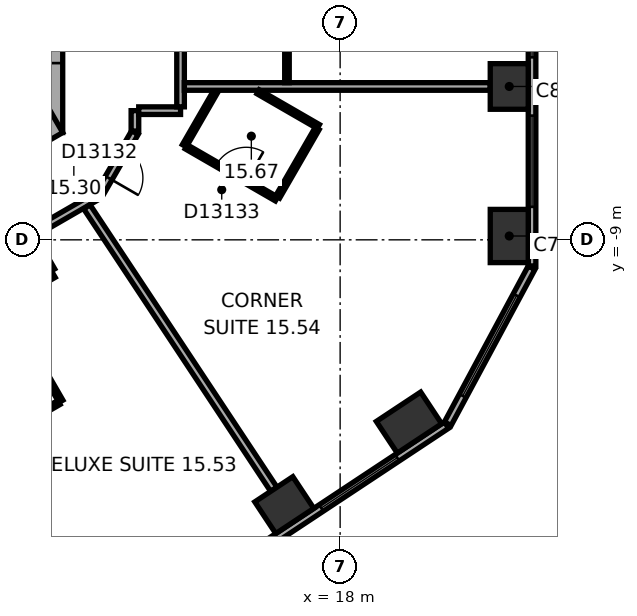
"""IFC4 building model, lengths in metres.
Left out: names, types, materials, properties, quantities, classifications, styles, units other than length and angle.
Written with IfcOpenShell. Run it as: python <this file> out.ifc"""

import sys

from ifc_helpers import new_model, si_unit, direction, frame, frame_2d, origin, origin_2d, place, context, subcontext, project, spatial, rectangle, extrude, element, fill, save


model = new_model("IFC4")
c1 = context("Model", 3, precision=1e-05, world=origin(), true_north=direction((0.0, 1.0)))
c2 = subcontext(c1, "Body", "Model", "MODEL_VIEW")
j1 = project(units=[si_unit("LENGTHUNIT", "METRE"), si_unit("PLANEANGLEUNIT", "RADIAN")], contexts=[c1])
p1 = place(None, origin())
s1 = spatial("IfcSite", under=j1, at=p1, CompositionType="ELEMENT")
p2 = place(p1, origin())
s2 = spatial("IfcBuilding", under=s1, at=p2, CompositionType="ELEMENT")
p3 = place(p2, frame((0.0, 0.0, 70.4)))
s3 = spatial("IfcBuildingStorey", under=s2, at=p3, CompositionType="ELEMENT", Elevation=70.4)
p4 = place(p3, frame((22.45, -8.899, 0.0), z_axis=(0.0, 0.0, 1.0), x_axis=(0.0, 1.0, 0.0)))
e1 = element("IfcColumn", 1, at=p4, inside=s3, PredefinedType="COLUMN", context=c2, shape_type="SweptSolid", body=[
    extrude(rectangle(XDim=1.4, YDim=1.0, at=origin_2d()), origin(), (0.0, 0.0, 1.0), 3.3),
])
for number, where, z_axis, x_axis in (
    (2, (22.45, -4.965, 0.0), (0.0, 0.0, 1.0), (0.0, 1.0, 0.0)),
    (3, (16.531, -15.981, 0.0), (0.0, 0.0, 1.0), (0.834, 0.552, 0.0)),
):
    element("IfcColumn", number, at=place(p3, frame(where, z_axis=z_axis, x_axis=x_axis)), inside=s3, PredefinedType="COLUMN", context=c2, shape_type="SweptSolid", body=[
        extrude(rectangle(XDim=1.2, YDim=1.0, at=origin_2d()), origin(), (0.0, 0.0, 1.0), 3.3),
    ])
p5 = place(p3, frame((19.812, -13.809, 0.0), z_axis=(0.0, 0.0, 1.0), x_axis=(0.833885822067, 0.551936985312, 0.0)))
e4 = element("IfcColumn", 4, at=p5, inside=s3, PredefinedType="COLUMN", context=c2, shape_type="SweptSolid", body=[
    extrude(rectangle(XDim=1.4, YDim=1.0, at=origin_2d()), origin(), (0.0, 0.0, 1.0), 3.3),
])
p6 = place(p3, frame((10.1, -6.177, 0.0), z_axis=(0.0, 0.0, 1.0), x_axis=(0.0, 1.0, 0.0)))
e5 = element("IfcWall", 5, at=p6, inside=s3, PredefinedType="SHEAR", context=c2, shape_type="SweptSolid", body=[
    extrude(rectangle(XDim=12.355, YDim=1.2, at=frame_2d((6.177, 0.0))), origin(), (0.0, 0.0, 1.0), 3.3),
])
p7 = place(p6, frame((6.378, 0.0, 0.0)))
e6 = element("IfcOpeningElement", 6, at=p7, cuts=e5, PredefinedType="OPENING", context=c2, shape_type="SweptSolid", body=[
    extrude(rectangle(XDim=1.5, YDim=2.1, at=frame_2d((0.75, 1.05))), frame((0.0, 0.61, 0.0), z_axis=(0.0, -1.0, 0.0), x_axis=(1.0, 0.0, 0.0)), (0.0, 0.0, 1.0), 1.22),
])
p8 = place(p6, frame((1.828, 0.0, 0.0)))
e7 = element("IfcOpeningElement", 7, at=p8, cuts=e5, PredefinedType="OPENING", context=c2, shape_type="SweptSolid", body=[
    extrude(rectangle(XDim=1.1, YDim=2.1, at=frame_2d((0.55, 1.05))), frame((0.0, 0.61, 0.0), z_axis=(0.0, -1.0, 0.0), x_axis=(1.0, 0.0, 0.0)), (0.0, 0.0, 1.0), 1.22),
])
p9 = place(p6, frame((4.427, 0.0, 0.0)))
e8 = element("IfcOpeningElement", 8, at=p9, cuts=e5, PredefinedType="OPENING", context=c2, shape_type="SweptSolid", body=[
    extrude(rectangle(XDim=1.1, YDim=2.1, at=frame_2d((0.55, 1.05))), frame((0.0, 0.61, 0.0), z_axis=(0.0, -1.0, 0.0), x_axis=(1.0, 0.0, 0.0)), (0.0, 0.0, 1.0), 1.22),
])
p10 = place(p3, frame((-0.3, -11.836, 0.0), z_axis=(0.0, 0.0, 1.0), x_axis=(0.866021384402, 0.500006961711, 0.0)))
e9 = element("IfcWall", 9, at=p10, inside=s3, PredefinedType="SHEAR", context=c2, shape_type="SweptSolid", body=[
    extrude(rectangle(XDim=12.355, YDim=1.2, at=frame_2d((6.178, 0.0))), origin(), (0.0, 0.0, 1.0), 3.3),
])
p11 = place(p10, frame((4.128, 0.0, 0.0)))
e10 = element("IfcOpeningElement", 10, at=p11, cuts=e9, PredefinedType="OPENING", context=c2, shape_type="SweptSolid", body=[
    extrude(rectangle(XDim=0.9, YDim=2.1, at=frame_2d((0.45, 1.05))), frame((0.0, 0.61, 0.0), z_axis=(0.0, -1.0, 0.0), x_axis=(1.0, 0.0, 0.0)), (0.0, 0.0, 1.0), 1.22),
])
p12 = place(p10, frame((7.928, 0.0, 0.0)))
e11 = element("IfcOpeningElement", 11, at=p12, cuts=e9, PredefinedType="OPENING", context=c2, shape_type="SweptSolid", body=[
    extrude(rectangle(XDim=1.1, YDim=2.1, at=frame_2d((0.55, 1.05))), frame((0.0, 0.61, 0.0), z_axis=(0.0, -1.0, 0.0), x_axis=(1.0, 0.0, 0.0)), (0.0, 0.0, 1.0), 1.22),
])
p13 = place(p3, frame((23.05, -9.687, 0.0), z_axis=(0.0, 0.0, 1.0), x_axis=(0.0, 1.0, 0.0)))
e12 = element("IfcWall", 12, at=p13, inside=s3, PredefinedType="STANDARD", context=c2, shape_type="SweptSolid", body=[
    extrude(rectangle(XDim=21.246, YDim=0.2, at=frame_2d((10.623, 0.0))), origin(), (0.0, 0.0, 1.0), 3.3),
])
p14 = place(p13, frame((1.555, 0.0, 0.8)))
e13 = element("IfcOpeningElement", 13, at=p14, cuts=e12, PredefinedType="OPENING", context=c2, shape_type="SweptSolid", body=[
    extrude(rectangle(XDim=2.4, YDim=1.7, at=frame_2d((1.2, 0.85))), frame((0.0, 0.11, 0.0), z_axis=(0.0, -1.0, 0.0), x_axis=(1.0, 0.0, 0.0)), (0.0, 0.0, 1.0), 0.22),
])
p15 = place(p13, frame((5.489, 0.0, 0.8)))
e14 = element("IfcOpeningElement", 14, at=p15, cuts=e12, PredefinedType="OPENING", context=c2, shape_type="SweptSolid", body=[
    extrude(rectangle(XDim=2.4, YDim=1.7, at=frame_2d((1.2, 0.85))), frame((0.0, 0.11, 0.0), z_axis=(0.0, -1.0, 0.0), x_axis=(1.0, 0.0, 0.0)), (0.0, 0.0, 1.0), 0.22),
])
p16 = place(p13, frame((9.424, 0.0, 0.8)))
e15 = element("IfcOpeningElement", 15, at=p16, cuts=e12, PredefinedType="OPENING", context=c2, shape_type="SweptSolid", body=[
    extrude(rectangle(XDim=2.4, YDim=1.7, at=frame_2d((1.2, 0.85))), frame((0.0, 0.11, 0.0), z_axis=(0.0, -1.0, 0.0), x_axis=(1.0, 0.0, 0.0)), (0.0, 0.0, 1.0), 0.22),
])
p17 = place(p13, frame((13.358, 0.0, 0.8)))
e16 = element("IfcOpeningElement", 16, at=p17, cuts=e12, PredefinedType="OPENING", context=c2, shape_type="SweptSolid", body=[
    extrude(rectangle(XDim=2.4, YDim=1.7, at=frame_2d((1.2, 0.85))), frame((0.0, 0.11, 0.0), z_axis=(0.0, -1.0, 0.0), x_axis=(1.0, 0.0, 0.0)), (0.0, 0.0, 1.0), 0.22),
])
p18 = place(p13, frame((17.293, 0.0, 0.8)))
e17 = element("IfcOpeningElement", 17, at=p18, cuts=e12, PredefinedType="OPENING", context=c2, shape_type="SweptSolid", body=[
    extrude(rectangle(XDim=2.4, YDim=1.7, at=frame_2d((1.2, 0.85))), frame((0.0, 0.11, 0.0), z_axis=(0.0, -1.0, 0.0), x_axis=(1.0, 0.0, 0.0)), (0.0, 0.0, 1.0), 0.22),
])
p19 = place(p3, frame((3.083, -25.601, 0.0), z_axis=(0.0, 0.0, 1.0), x_axis=(0.833884295743, 0.551939291329, 0.0)))
e18 = element("IfcWall", 18, at=p19, inside=s3, PredefinedType="STANDARD", context=c2, shape_type="SweptSolid", body=[
    extrude(rectangle(XDim=21.246, YDim=0.2, at=frame_2d((10.623, 0.0))), origin(), (0.0, 0.0, 1.0), 3.3),
])
p20 = place(p19, frame((1.553, 0.0, 0.8)))
e19 = element("IfcOpeningElement", 19, at=p20, cuts=e18, PredefinedType="OPENING", context=c2, shape_type="SweptSolid", body=[
    extrude(rectangle(XDim=2.4, YDim=1.7, at=frame_2d((1.2, 0.85))), frame((0.0, 0.11, 0.0), z_axis=(0.0, -1.0, 0.0), x_axis=(1.0, 0.0, 0.0)), (0.0, 0.0, 1.0), 0.22),
])
p21 = place(p19, frame((5.488, 0.0, 0.8)))
e20 = element("IfcOpeningElement", 20, at=p21, cuts=e18, PredefinedType="OPENING", context=c2, shape_type="SweptSolid", body=[
    extrude(rectangle(XDim=2.4, YDim=1.7, at=frame_2d((1.2, 0.85))), frame((0.0, 0.11, 0.0), z_axis=(0.0, -1.0, 0.0), x_axis=(1.0, 0.0, 0.0)), (0.0, 0.0, 1.0), 0.22),
])
p22 = place(p19, frame((9.422, 0.0, 0.8)))
e21 = element("IfcOpeningElement", 21, at=p22, cuts=e18, PredefinedType="OPENING", context=c2, shape_type="SweptSolid", body=[
    extrude(rectangle(XDim=2.4, YDim=1.7, at=frame_2d((1.2, 0.85))), frame((0.0, 0.11, 0.0), z_axis=(0.0, -1.0, 0.0), x_axis=(1.0, 0.0, 0.0)), (0.0, 0.0, 1.0), 0.22),
])
p23 = place(p19, frame((13.357, 0.0, 0.8)))
e22 = element("IfcOpeningElement", 22, at=p23, cuts=e18, PredefinedType="OPENING", context=c2, shape_type="SweptSolid", body=[
    extrude(rectangle(XDim=2.4, YDim=1.7, at=frame_2d((1.2, 0.85))), frame((0.0, 0.11, 0.0), z_axis=(0.0, -1.0, 0.0), x_axis=(1.0, 0.0, 0.0)), (0.0, 0.0, 1.0), 0.22),
])
p24 = place(p19, frame((17.291, 0.0, 0.8)))
e23 = element("IfcOpeningElement", 23, at=p24, cuts=e18, PredefinedType="OPENING", context=c2, shape_type="SweptSolid", body=[
    extrude(rectangle(XDim=2.4, YDim=1.7, at=frame_2d((1.2, 0.85))), frame((0.0, 0.11, 0.0), z_axis=(0.0, -1.0, 0.0), x_axis=(1.0, 0.0, 0.0)), (0.0, 0.0, 1.0), 0.22),
])
p25 = place(p3, frame((20.833, -13.839, 0.0), z_axis=(0.0, 0.0, 1.0), x_axis=(0.473321668581, 0.880889662813, 0.0)))
e24 = element("IfcWall", 24, at=p25, inside=s3, PredefinedType="STANDARD", context=c2, shape_type="SweptSolid", body=[
    extrude(rectangle(XDim=4.66, YDim=0.2, at=frame_2d((2.33, 0.0))), origin(), (0.0, 0.0, 1.0), 3.3),
])
p26 = place(p25, frame((0.83, 0.0, 0.8)))
e25 = element("IfcOpeningElement", 25, at=p26, cuts=e24, PredefinedType="OPENING", context=c2, shape_type="SweptSolid", body=[
    extrude(rectangle(XDim=3.0, YDim=1.7, at=frame_2d((1.5, 0.85))), frame((0.0, 0.11, 0.0), z_axis=(0.0, -1.0, 0.0), x_axis=(1.0, 0.0, 0.0)), (0.0, 0.0, 1.0), 0.22),
])
p27 = place(p3, frame((7.385, -11.673, 0.0), z_axis=(0.0, 0.0, 1.0), x_axis=(0.866037524642, 0.499979005472, 0.0)))
e26 = element("IfcWall", 26, at=p27, inside=s3, PredefinedType="PARTITIONING", context=c2, shape_type="SweptSolid", body=[
    extrude(rectangle(XDim=3.542, YDim=0.2, at=frame_2d((1.771, 0.0))), origin(), (0.0, 0.0, 1.0), 3.05),
])
p28 = place(p3, frame((9.203, -10.738, 0.0), z_axis=(0.0, 0.0, 1.0), x_axis=(0.50005036918, -0.865996321171, 0.0)))
e27 = element("IfcWall", 27, at=p28, inside=s3, PredefinedType="PARTITIONING", context=c2, shape_type="SweptSolid", body=[
    extrude(rectangle(XDim=2.9, YDim=0.12, at=frame_2d((1.45, 0.0))), origin(), (0.0, 0.0, 1.0), 3.05),
])
p29 = place(p3, frame((9.852, -8.861, 0.0), z_axis=(0.0, 0.0, 1.0), x_axis=(0.866013291437, 0.500020978615, 0.0)))
e28 = element("IfcWall", 28, at=p29, inside=s3, PredefinedType="PARTITIONING", context=c2, shape_type="SweptSolid", body=[
    extrude(rectangle(XDim=2.077, YDim=0.2, at=frame_2d((1.038, 0.0))), origin(), (0.0, 0.0, 1.0), 3.05),
])
p30 = place(p3, frame((10.402, -9.815, 0.0), z_axis=(0.0, 0.0, 1.0), x_axis=(-0.499968756647, 0.866043441391, 0.0)))
e29 = element("IfcWall", 29, at=p30, inside=s3, PredefinedType="PARTITIONING", context=c2, shape_type="SweptSolid", body=[
    extrude(rectangle(XDim=1.001, YDim=0.2, at=frame_2d((0.5, 0.0))), origin(), (0.0, 0.0, 1.0), 3.05),
])
p31 = place(p3, frame((10.601, -13.28, 0.0), z_axis=(0.0, 0.0, 1.0), x_axis=(-0.866044057189, -0.499967689963, 0.0)))
e30 = element("IfcWall", 30, at=p31, inside=s3, PredefinedType="PARTITIONING", context=c2, shape_type="SweptSolid", body=[
    extrude(rectangle(XDim=1.982, YDim=0.12, at=frame_2d((0.991, 0.0))), origin(), (0.0, 0.0, 1.0), 3.05),
])
p32 = place(p3, frame((11.67, -7.788, 0.0), z_axis=(0.0, 0.0, 1.0), x_axis=(0.500063286585, 0.865988862174, 0.0)))
e31 = element("IfcWall", 31, at=p32, inside=s3, PredefinedType="PARTITIONING", context=c2, shape_type="SweptSolid", body=[
    extrude(rectangle(XDim=1.86, YDim=0.2, at=frame_2d((0.93, 0.0))), origin(), (0.0, 0.0, 1.0), 3.05),
])
p33 = place(p32, frame((0.48, 0.0, 0.0)))
e32 = element("IfcOpeningElement", 32, at=p33, cuts=e31, PredefinedType="OPENING", context=c2, shape_type="SweptSolid", body=[
    extrude(rectangle(XDim=0.9, YDim=2.1, at=frame_2d((0.45, 1.05))), frame((0.0, 0.11, 0.0), z_axis=(0.0, -1.0, 0.0), x_axis=(1.0, 0.0, 0.0)), (0.0, 0.0, 1.0), 0.22),
])
p34 = place(p3, frame((12.6, -6.138, 0.0), z_axis=(0.0, 0.0, 1.0), x_axis=(0.0, 1.0, 0.0)))
e33 = element("IfcWall", 33, at=p34, inside=s3, PredefinedType="PARTITIONING", context=c2, shape_type="SweptSolid", body=[
    extrude(rectangle(XDim=0.537, YDim=0.2, at=frame_2d((0.268, 0.0))), origin(), (0.0, 0.0, 1.0), 3.05),
])
p35 = place(p3, frame((12.7, -5.601, 0.0), z_axis=(0.0, 0.0, 1.0), x_axis=(1.0, 0.0, 0.0)))
e34 = element("IfcWall", 34, at=p35, inside=s3, PredefinedType="PARTITIONING", context=c2, shape_type="SweptSolid", body=[
    extrude(rectangle(XDim=1.101, YDim=0.2, at=frame_2d((0.551, 0.0))), origin(), (0.0, 0.0, 1.0), 3.05),
])
p36 = place(p3, frame((13.801, -5.501, 0.0), z_axis=(0.0, 0.0, 1.0), x_axis=(0.0, 1.0, 0.0)))
e35 = element("IfcWall", 35, at=p36, inside=s3, PredefinedType="PARTITIONING", context=c2, shape_type="SweptSolid", body=[
    extrude(rectangle(XDim=5.702, YDim=0.2, at=frame_2d((2.851, 0.0))), origin(), (0.0, 0.0, 1.0), 3.05),
])
p37 = place(p3, frame((13.901, -6.524, 0.0), z_axis=(0.0, 0.0, 1.0), x_axis=(0.499964162598, 0.86604609353, 0.0)))
e36 = element("IfcWall", 36, at=p37, inside=s3, PredefinedType="PARTITIONING", context=c2, shape_type="SweptSolid", body=[
    extrude(rectangle(XDim=1.661, YDim=0.12, at=frame_2d((0.831, 0.0))), origin(), (0.0, 0.0, 1.0), 3.05),
])
p38 = place(p3, frame((13.901, -4.965, 0.0), z_axis=(0.0, 0.0, 1.0), x_axis=(1.0, 0.0, 0.0)))
e37 = element("IfcWall", 37, at=p38, inside=s3, PredefinedType="PARTITIONING", context=c2, shape_type="SweptSolid", body=[
    extrude(rectangle(XDim=8.049, YDim=0.2, at=frame_2d((4.024, 0.0))), origin(), (0.0, 0.0, 1.0), 3.05),
])
p39 = place(p3, frame((15.841, -5.104, 0.0), z_axis=(0.0, 0.0, 1.0), x_axis=(0.866025591402, -0.499999675036, 0.0)))
e38 = element("IfcWall", 38, at=p39, inside=s3, PredefinedType="PARTITIONING", context=c2, shape_type="SweptSolid", body=[
    extrude(rectangle(XDim=1.83, YDim=0.12, at=frame_2d((0.915, 0.0))), origin(), (0.0, 0.0, 1.0), 3.05),
])
p40 = place(p3, frame((16.255, -15.564, 0.0), z_axis=(0.0, 0.0, 1.0), x_axis=(-0.55192208744, 0.833895682562, 0.0)))
e39 = element("IfcWall", 39, at=p40, inside=s3, PredefinedType="PARTITIONING", context=c2, shape_type="SweptSolid", body=[
    extrude(rectangle(XDim=8.913, YDim=0.2, at=frame_2d((4.457, 0.0))), origin(), (0.0, 0.0, 1.0), 2.6),
])
p41 = place(p3, frame((16.326, -7.925, 0.0), z_axis=(0.0, 0.0, 1.0), x_axis=(-0.865997131366, 0.500048966069, 0.0)))
e40 = element("IfcWall", 40, at=p41, inside=s3, PredefinedType="PARTITIONING", context=c2, shape_type="SweptSolid", body=[
    extrude(rectangle(XDim=2.74, YDim=0.12, at=frame_2d((1.37, 0.0))), origin(), (0.0, 0.0, 1.0), 3.05),
])
p42 = place(p41, frame((0.92, 0.0, 0.0)))
e41 = element("IfcOpeningElement", 41, at=p42, cuts=e40, PredefinedType="OPENING", context=c2, shape_type="SweptSolid", body=[
    extrude(rectangle(XDim=0.9, YDim=2.1, at=frame_2d((0.45, 1.05))), frame((0.0, 0.07, 0.0), z_axis=(0.0, -1.0, 0.0), x_axis=(1.0, 0.0, 0.0)), (0.0, 0.0, 1.0), 0.14),
])
p43 = place(p3, frame((16.601, -2.425, 0.0), z_axis=(0.0, 0.0, 1.0), x_axis=(0.0, -1.0, 0.0)))
e42 = element("IfcWall", 42, at=p43, inside=s3, PredefinedType="PARTITIONING", context=c2, shape_type="SweptSolid", body=[
    extrude(rectangle(XDim=2.44, YDim=0.12, at=frame_2d((1.22, 0.0))), origin(), (0.0, 0.0, 1.0), 3.05),
])
p44 = place(p3, frame((17.396, -6.071, 0.0), z_axis=(0.0, 0.0, 1.0), x_axis=(-0.500027264788, -0.866009661879, 0.0)))
e43 = element("IfcWall", 43, at=p44, inside=s3, PredefinedType="PARTITIONING", context=c2, shape_type="SweptSolid", body=[
    extrude(rectangle(XDim=2.08, YDim=0.12, at=frame_2d((1.04, 0.0))), origin(), (0.0, 0.0, 1.0), 3.05),
])
p45 = place(p14, origin())
e44 = element("IfcWindow", 44, at=p45, inside=s3, PartitioningType="SINGLE_PANEL", PredefinedType="WINDOW", context=c2, shape_type="SweptSolid", body=[
    extrude(rectangle(XDim=2.4, YDim=1.7, at=frame_2d((1.2, 0.85))), frame((0.0, 0.03, 0.0), z_axis=(0.0, -1.0, 0.0), x_axis=(1.0, 0.0, 0.0)), (0.0, 0.0, 1.0), 0.06),
])
fill(e13, e44)
p46 = place(p15, origin())
e45 = element("IfcWindow", 45, at=p46, inside=s3, PartitioningType="SINGLE_PANEL", PredefinedType="WINDOW", context=c2, shape_type="SweptSolid", body=[
    extrude(rectangle(XDim=2.4, YDim=1.7, at=frame_2d((1.2, 0.85))), frame((0.0, 0.03, 0.0), z_axis=(0.0, -1.0, 0.0), x_axis=(1.0, 0.0, 0.0)), (0.0, 0.0, 1.0), 0.06),
])
fill(e14, e45)
p47 = place(p24, origin())
e46 = element("IfcWindow", 46, at=p47, inside=s3, PartitioningType="SINGLE_PANEL", PredefinedType="WINDOW", context=c2, shape_type="SweptSolid", body=[
    extrude(rectangle(XDim=2.4, YDim=1.7, at=frame_2d((1.2, 0.85))), frame((0.0, 0.03, 0.0), z_axis=(0.0, -1.0, 0.0), x_axis=(1.0, 0.0, 0.0)), (0.0, 0.0, 1.0), 0.06),
])
fill(e23, e46)
p48 = place(p26, origin())
e47 = element("IfcWindow", 47, at=p48, inside=s3, PartitioningType="SINGLE_PANEL", PredefinedType="WINDOW", context=c2, shape_type="SweptSolid", body=[
    extrude(rectangle(XDim=3.0, YDim=1.7, at=frame_2d((1.5, 0.85))), frame((0.0, 0.03, 0.0), z_axis=(0.0, -1.0, 0.0), x_axis=(1.0, 0.0, 0.0)), (0.0, 0.0, 1.0), 0.06),
])
fill(e25, e47)
p49 = place(p33, origin())
e48 = element("IfcDoor", 48, at=p49, inside=s3, OperationType="SINGLE_SWING_LEFT", PredefinedType="DOOR", context=c2, shape_type="SweptSolid", body=[
    extrude(rectangle(XDim=0.9, YDim=2.1, at=frame_2d((0.45, 1.05))), frame((0.0, 0.025, 0.0), z_axis=(0.0, -1.0, 0.0), x_axis=(1.0, 0.0, 0.0)), (0.0, 0.0, 1.0), 0.05),
])
fill(e32, e48)
p50 = place(p42, origin())
e49 = element("IfcDoor", 49, at=p50, inside=s3, OperationType="SINGLE_SWING_LEFT", PredefinedType="DOOR", context=c2, shape_type="SweptSolid", body=[
    extrude(rectangle(XDim=0.9, YDim=2.1, at=frame_2d((0.45, 1.05))), frame((0.0, 0.025, 0.0), z_axis=(0.0, -1.0, 0.0), x_axis=(1.0, 0.0, 0.0)), (0.0, 0.0, 1.0), 0.05),
])
fill(e41, e49)
save(model, sys.argv[1])
